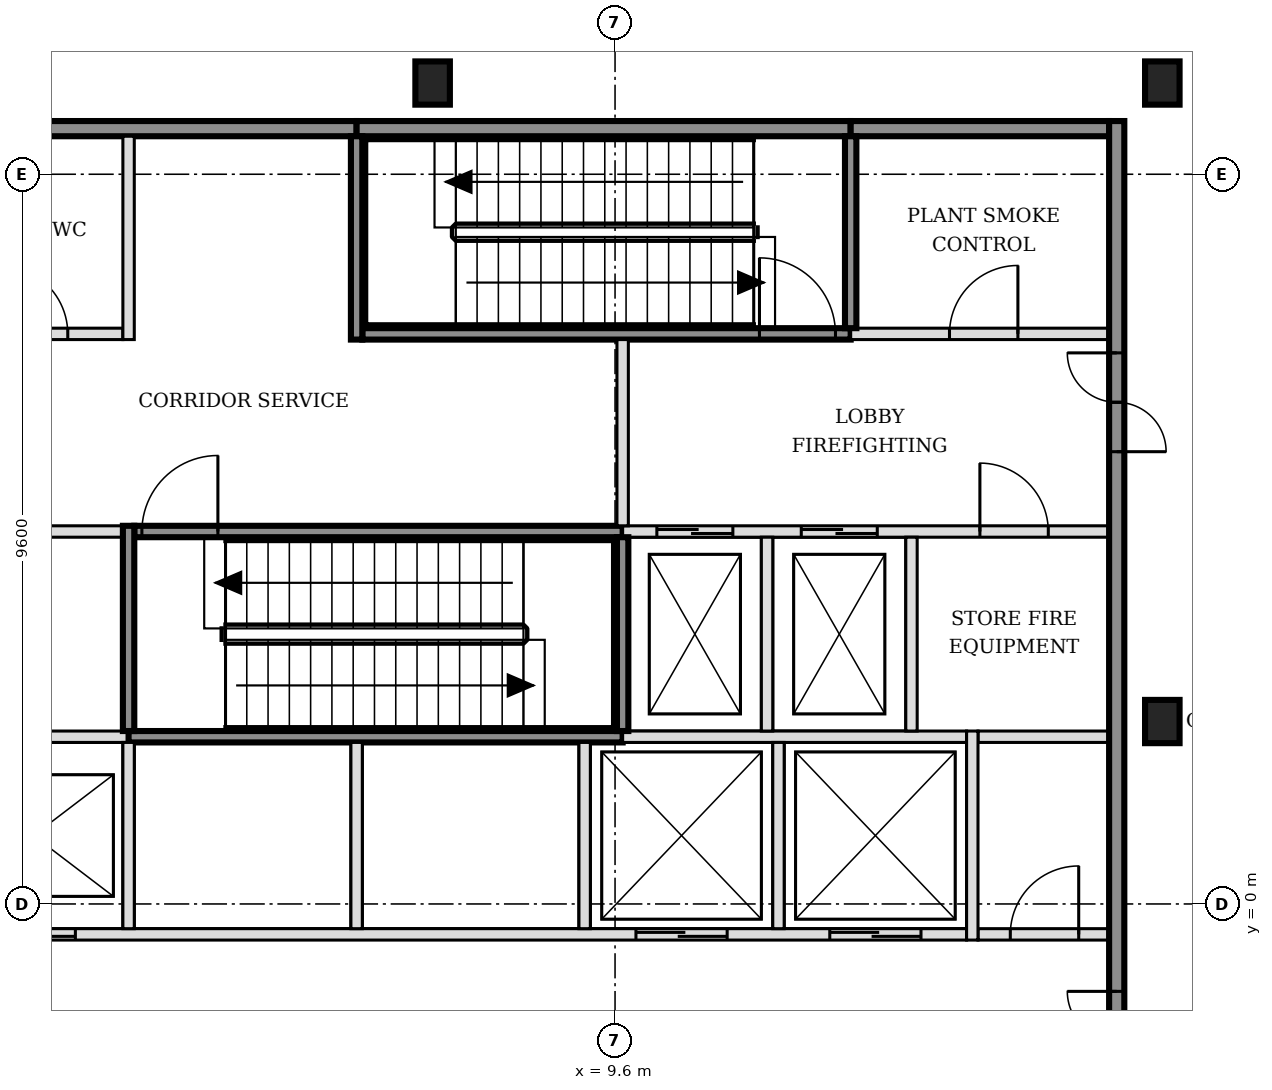
"""IFC4 building model, lengths in metres.
Left out: names, types, materials, properties, quantities, classifications, styles, units other than length and angle.
Written with IfcOpenShell. Run it as: python <this file> out.ifc"""

import sys

from ifc_helpers import new_model, si_unit, direction, frame, frame_2d, origin, origin_2d, place, context, subcontext, project, spatial, rectangle, i_section, extrude, element, fill, save


model = new_model("IFC4")
c1 = context("Model", 3, precision=1e-05, world=origin(), true_north=direction((0.0, 1.0)))
c2 = subcontext(c1, "Body", "Model", "MODEL_VIEW")
j1 = project(units=[si_unit("LENGTHUNIT", "METRE"), si_unit("PLANEANGLEUNIT", "RADIAN")], contexts=[c1])
p1 = place(None, origin())
s1 = spatial("IfcSite", under=j1, at=p1, CompositionType="ELEMENT")
p2 = place(p1, origin())
s2 = spatial("IfcBuilding", under=s1, at=p2, CompositionType="ELEMENT")
p3 = place(p2, frame((0.0, 0.0, 25.8)))
s3 = spatial("IfcBuildingStorey", under=s2, at=p3, CompositionType="ELEMENT", Elevation=25.8)
for number, where, z_axis, x_axis in (
    (1, (16.8, 2.4, -0.2), (0.0, 0.0, 1.0), (1.0, 0.0, 0.0)),
    (2, (7.2, 10.8, -0.2), (0.0, 0.0, 1.0), (1.0, 0.0, 0.0)),
    (3, (16.8, 10.8, -0.2), (0.0, 0.0, 1.0), (1.0, 0.0, 0.0)),
):
    element("IfcColumn", number, at=place(p3, frame(where, z_axis=z_axis, x_axis=x_axis)), inside=s3, PredefinedType="COLUMN", context=c2, shape_type="SweptSolid", body=[
        extrude(i_section(OverallWidth=0.454, OverallDepth=0.569, WebThickness=0.078, FlangeThickness=0.125, FilletRadius=0.015, at=origin_2d()), origin(), (0.0, 0.0, 1.0), 4.8),
    ])
p4 = place(p3, frame((-1.7, -0.4, 0.0), z_axis=(0.0, 0.0, 1.0), x_axis=(1.0, 0.0, 0.0)))
e4 = element("IfcWall", 4, at=p4, inside=s3, PredefinedType="SOLIDWALL", context=c2, shape_type="SweptSolid", body=[
    extrude(rectangle(XDim=15.925, YDim=0.15, at=frame_2d((7.962, 0.0))), origin(), (0.0, 0.0, 1.0), 4.6),
])
p5 = place(p4, frame((0.6, 0.0, 0.0)))
e5 = element("IfcOpeningElement", 5, at=p5, cuts=e4, PredefinedType="OPENING", context=c2, shape_type="SweptSolid", body=[
    extrude(rectangle(XDim=1.1, YDim=2.1, at=frame_2d((0.55, 1.05))), frame((0.0, 0.085, 0.0), z_axis=(0.0, -1.0, 0.0), x_axis=(1.0, 0.0, 0.0)), (0.0, 0.0, 1.0), 0.17),
])
p6 = place(p4, frame((3.1, 0.0, 0.0)))
e6 = element("IfcOpeningElement", 6, at=p6, cuts=e4, PredefinedType="OPENING", context=c2, shape_type="SweptSolid", body=[
    extrude(rectangle(XDim=1.1, YDim=2.1, at=frame_2d((0.55, 1.05))), frame((0.0, 0.085, 0.0), z_axis=(0.0, -1.0, 0.0), x_axis=(1.0, 0.0, 0.0)), (0.0, 0.0, 1.0), 0.17),
])
p7 = place(p4, frame((11.575, 0.0, 0.0)))
e7 = element("IfcOpeningElement", 7, at=p7, cuts=e4, PredefinedType="OPENING", context=c2, shape_type="SweptSolid", body=[
    extrude(rectangle(XDim=1.2, YDim=2.1, at=frame_2d((0.6, 1.05))), frame((0.0, 0.085, 0.0), z_axis=(0.0, -1.0, 0.0), x_axis=(1.0, 0.0, 0.0)), (0.0, 0.0, 1.0), 0.17),
])
p8 = place(p4, frame((14.125, 0.0, 0.0)))
e8 = element("IfcOpeningElement", 8, at=p8, cuts=e4, PredefinedType="OPENING", context=c2, shape_type="SweptSolid", body=[
    extrude(rectangle(XDim=1.2, YDim=2.1, at=frame_2d((0.6, 1.05))), frame((0.0, 0.085, 0.0), z_axis=(0.0, -1.0, 0.0), x_axis=(1.0, 0.0, 0.0)), (0.0, 0.0, 1.0), 0.17),
])
p9 = place(p3, frame((14.375, -0.4, 0.0), z_axis=(0.0, 0.0, 1.0), x_axis=(1.0, 0.0, 0.0)))
e9 = element("IfcWall", 9, at=p9, inside=s3, PredefinedType="PARTITIONING", context=c2, shape_type="SweptSolid", body=[
    extrude(rectangle(XDim=1.725, YDim=0.15, at=frame_2d((0.863, 0.0))), origin(), (0.0, 0.0, 1.0), 4.6),
])
p10 = place(p9, frame((0.425, 0.0, 0.0)))
e10 = element("IfcOpeningElement", 10, at=p10, cuts=e9, PredefinedType="OPENING", context=c2, shape_type="SweptSolid", body=[
    extrude(rectangle(XDim=0.9, YDim=2.1, at=frame_2d((0.45, 1.05))), frame((0.0, 0.085, 0.0), z_axis=(0.0, -1.0, 0.0), x_axis=(1.0, 0.0, 0.0)), (0.0, 0.0, 1.0), 0.17),
])
p11 = place(p3, frame((-1.7, 2.2, 0.0), z_axis=(0.0, 0.0, 1.0), x_axis=(1.0, 0.0, 0.0)))
e11 = element("IfcWall", 11, at=p11, inside=s3, PredefinedType="SOLIDWALL", context=c2, shape_type="SweptSolid", body=[
    extrude(rectangle(XDim=4.9, YDim=0.15, at=frame_2d((2.45, 0.0))), origin(), (0.0, 0.0, 1.0), 4.6),
])
p12 = place(p3, frame((3.2, 2.2, 0.0), z_axis=(0.0, 0.0, 1.0), x_axis=(1.0, 0.0, 0.0)))
e12 = element("IfcWall", 12, at=p12, inside=s3, PredefinedType="SOLIDWALL", context=c2, shape_type="SweptSolid", body=[
    extrude(rectangle(XDim=6.5, YDim=0.15, at=frame_2d((3.25, 0.0))), origin(), (0.0, 0.0, 1.0), 4.6),
])
p13 = place(p3, frame((9.7, 2.2, 0.0), z_axis=(0.0, 0.0, 1.0), x_axis=(1.0, 0.0, 0.0)))
e13 = element("IfcWall", 13, at=p13, inside=s3, PredefinedType="SOLIDWALL", context=c2, shape_type="SweptSolid", body=[
    extrude(rectangle(XDim=4.525, YDim=0.15, at=frame_2d((2.263, 0.0))), origin(), (0.0, 0.0, 1.0), 4.6),
])
p14 = place(p3, frame((14.375, 2.2, 0.0), z_axis=(0.0, 0.0, 1.0), x_axis=(1.0, 0.0, 0.0)))
e14 = element("IfcWall", 14, at=p14, inside=s3, PredefinedType="PARTITIONING", context=c2, shape_type="SweptSolid", body=[
    extrude(rectangle(XDim=1.725, YDim=0.15, at=frame_2d((0.863, 0.0))), origin(), (0.0, 0.0, 1.0), 4.6),
])
p15 = place(p3, frame((-1.7, 4.9, 0.0), z_axis=(0.0, 0.0, 1.0), x_axis=(1.0, 0.0, 0.0)))
e15 = element("IfcWall", 15, at=p15, inside=s3, PredefinedType="PARTITIONING", context=c2, shape_type="SweptSolid", body=[
    extrude(rectangle(XDim=4.825, YDim=0.15, at=frame_2d((2.413, 0.0))), origin(), (0.0, 0.0, 1.0), 4.6),
])
p16 = place(p15, frame((1.95, 0.0, 0.0)))
e16 = element("IfcOpeningElement", 16, at=p16, cuts=e15, PredefinedType="OPENING", context=c2, shape_type="SweptSolid", body=[
    extrude(rectangle(XDim=0.9, YDim=2.1, at=frame_2d((0.45, 1.05))), frame((0.0, 0.085, 0.0), z_axis=(0.0, -1.0, 0.0), x_axis=(1.0, 0.0, 0.0)), (0.0, 0.0, 1.0), 0.17),
])
p17 = place(p3, frame((3.275, 4.9, 0.0), z_axis=(0.0, 0.0, 1.0), x_axis=(1.0, 0.0, 0.0)))
e17 = element("IfcWall", 17, at=p17, inside=s3, PredefinedType="SOLIDWALL", context=c2, shape_type="SweptSolid", body=[
    extrude(rectangle(XDim=6.425, YDim=0.15, at=frame_2d((3.212, 0.0))), origin(), (0.0, 0.0, 1.0), 4.6),
])
p18 = place(p17, frame((0.1, 0.0, 0.0)))
e18 = element("IfcOpeningElement", 18, at=p18, cuts=e17, PredefinedType="OPENING", context=c2, shape_type="SweptSolid", body=[
    extrude(rectangle(XDim=1.0, YDim=2.1, at=frame_2d((0.5, 1.05))), frame((0.0, 0.085, 0.0), z_axis=(0.0, -1.0, 0.0), x_axis=(1.0, 0.0, 0.0)), (0.0, 0.0, 1.0), 0.17),
])
p19 = place(p3, frame((9.7, 4.9, 0.0), z_axis=(0.0, 0.0, 1.0), x_axis=(1.0, 0.0, 0.0)))
e19 = element("IfcWall", 19, at=p19, inside=s3, PredefinedType="SOLIDWALL", context=c2, shape_type="SweptSolid", body=[
    extrude(rectangle(XDim=6.4, YDim=0.15, at=frame_2d((3.2, 0.0))), origin(), (0.0, 0.0, 1.0), 4.6),
])
p20 = place(p19, frame((0.45, 0.0, 0.0)))
e20 = element("IfcOpeningElement", 20, at=p20, cuts=e19, PredefinedType="OPENING", context=c2, shape_type="SweptSolid", body=[
    extrude(rectangle(XDim=1.0, YDim=2.1, at=frame_2d((0.5, 1.05))), frame((0.0, 0.085, 0.0), z_axis=(0.0, -1.0, 0.0), x_axis=(1.0, 0.0, 0.0)), (0.0, 0.0, 1.0), 0.17),
])
p21 = place(p19, frame((2.35, 0.0, 0.0)))
e21 = element("IfcOpeningElement", 21, at=p21, cuts=e19, PredefinedType="OPENING", context=c2, shape_type="SweptSolid", body=[
    extrude(rectangle(XDim=1.0, YDim=2.1, at=frame_2d((0.5, 1.05))), frame((0.0, 0.085, 0.0), z_axis=(0.0, -1.0, 0.0), x_axis=(1.0, 0.0, 0.0)), (0.0, 0.0, 1.0), 0.17),
])
p22 = place(p19, frame((4.7, 0.0, 0.0)))
e22 = element("IfcOpeningElement", 22, at=p22, cuts=e19, PredefinedType="OPENING", context=c2, shape_type="SweptSolid", body=[
    extrude(rectangle(XDim=0.9, YDim=2.1, at=frame_2d((0.45, 1.05))), frame((0.0, 0.085, 0.0), z_axis=(0.0, -1.0, 0.0), x_axis=(1.0, 0.0, 0.0)), (0.0, 0.0, 1.0), 0.17),
])
p23 = place(p3, frame((-1.7, 7.5, 0.0), z_axis=(0.0, 0.0, 1.0), x_axis=(1.0, 0.0, 0.0)))
e23 = element("IfcWall", 23, at=p23, inside=s3, PredefinedType="PARTITIONING", context=c2, shape_type="SweptSolid", body=[
    extrude(rectangle(XDim=4.825, YDim=0.15, at=frame_2d((2.413, 0.0))), origin(), (0.0, 0.0, 1.0), 4.6),
])
p24 = place(p23, frame((0.7, 0.0, 0.0)))
e24 = element("IfcOpeningElement", 24, at=p24, cuts=e23, PredefinedType="OPENING", context=c2, shape_type="SweptSolid", body=[
    extrude(rectangle(XDim=0.9, YDim=2.1, at=frame_2d((0.45, 1.05))), frame((0.0, 0.085, 0.0), z_axis=(0.0, -1.0, 0.0), x_axis=(1.0, 0.0, 0.0)), (0.0, 0.0, 1.0), 0.17),
])
p25 = place(p23, frame((3.2, 0.0, 0.0)))
e25 = element("IfcOpeningElement", 25, at=p25, cuts=e23, PredefinedType="OPENING", context=c2, shape_type="SweptSolid", body=[
    extrude(rectangle(XDim=0.9, YDim=2.1, at=frame_2d((0.45, 1.05))), frame((0.0, 0.085, 0.0), z_axis=(0.0, -1.0, 0.0), x_axis=(1.0, 0.0, 0.0)), (0.0, 0.0, 1.0), 0.17),
])
p26 = place(p3, frame((6.275, 7.5, 0.0), z_axis=(0.0, 0.0, 1.0), x_axis=(1.0, 0.0, 0.0)))
e26 = element("IfcWall", 26, at=p26, inside=s3, PredefinedType="SOLIDWALL", context=c2, shape_type="SweptSolid", body=[
    extrude(rectangle(XDim=6.425, YDim=0.15, at=frame_2d((3.212, 0.0))), origin(), (0.0, 0.0, 1.0), 4.6),
])
p27 = place(p26, frame((5.225, 0.0, 0.0)))
e27 = element("IfcOpeningElement", 27, at=p27, cuts=e26, PredefinedType="OPENING", context=c2, shape_type="SweptSolid", body=[
    extrude(rectangle(XDim=1.0, YDim=2.1, at=frame_2d((0.5, 1.05))), frame((0.0, 0.085, 0.0), z_axis=(0.0, -1.0, 0.0), x_axis=(1.0, 0.0, 0.0)), (0.0, 0.0, 1.0), 0.17),
])
p28 = place(p3, frame((12.7, 7.5, 0.0), z_axis=(0.0, 0.0, 1.0), x_axis=(1.0, 0.0, 0.0)))
e28 = element("IfcWall", 28, at=p28, inside=s3, PredefinedType="SOLIDWALL", context=c2, shape_type="SweptSolid", body=[
    extrude(rectangle(XDim=3.4, YDim=0.15, at=frame_2d((1.7, 0.0))), origin(), (0.0, 0.0, 1.0), 4.6),
])
p29 = place(p28, frame((1.3, 0.0, 0.0)))
e29 = element("IfcOpeningElement", 29, at=p29, cuts=e28, PredefinedType="OPENING", context=c2, shape_type="SweptSolid", body=[
    extrude(rectangle(XDim=0.9, YDim=2.1, at=frame_2d((0.45, 1.05))), frame((0.0, 0.085, 0.0), z_axis=(0.0, -1.0, 0.0), x_axis=(1.0, 0.0, 0.0)), (0.0, 0.0, 1.0), 0.17),
])
p30 = place(p3, frame((-1.7, 10.2, 0.0), z_axis=(0.0, 0.0, 1.0), x_axis=(1.0, 0.0, 0.0)))
e30 = element("IfcWall", 30, at=p30, inside=s3, PredefinedType="SOLIDWALL", context=c2, shape_type="SweptSolid", body=[
    extrude(rectangle(XDim=7.9, YDim=0.2, at=frame_2d((3.95, 0.0))), origin(), (0.0, 0.0, 1.0), 4.6),
])
p31 = place(p3, frame((6.2, 10.2, 0.0), z_axis=(0.0, 0.0, 1.0), x_axis=(1.0, 0.0, 0.0)))
e31 = element("IfcWall", 31, at=p31, inside=s3, PredefinedType="SOLIDWALL", context=c2, shape_type="SweptSolid", body=[
    extrude(rectangle(XDim=6.5, YDim=0.2, at=frame_2d((3.25, 0.0))), origin(), (0.0, 0.0, 1.0), 4.6),
])
p32 = place(p3, frame((12.7, 10.2, 0.0), z_axis=(0.0, 0.0, 1.0), x_axis=(1.0, 0.0, 0.0)))
e32 = element("IfcWall", 32, at=p32, inside=s3, PredefinedType="SOLIDWALL", context=c2, shape_type="SweptSolid", body=[
    extrude(rectangle(XDim=3.4, YDim=0.2, at=frame_2d((1.7, 0.0))), origin(), (0.0, 0.0, 1.0), 4.6),
])
p33 = place(p3, frame((3.2, -0.325, 0.0), z_axis=(0.0, 0.0, 1.0), x_axis=(0.0, 1.0, 0.0)))
e33 = element("IfcWall", 33, at=p33, inside=s3, PredefinedType="SOLIDWALL", context=c2, shape_type="SweptSolid", body=[
    extrude(rectangle(XDim=2.45, YDim=0.15, at=frame_2d((1.225, 0.0))), origin(), (0.0, 0.0, 1.0), 4.6),
])
p34 = place(p3, frame((3.2, 2.275, 0.0), z_axis=(0.0, 0.0, 1.0), x_axis=(0.0, 1.0, 0.0)))
e34 = element("IfcWall", 34, at=p34, inside=s3, PredefinedType="SOLIDWALL", context=c2, shape_type="SweptSolid", body=[
    extrude(rectangle(XDim=2.7, YDim=0.15, at=frame_2d((1.35, 0.0))), origin(), (0.0, 0.0, 1.0), 4.6),
])
p35 = place(p3, frame((3.2, 7.425, 0.0), z_axis=(0.0, 0.0, 1.0), x_axis=(0.0, 1.0, 0.0)))
e35 = element("IfcWall", 35, at=p35, inside=s3, PredefinedType="PARTITIONING", context=c2, shape_type="SweptSolid", body=[
    extrude(rectangle(XDim=2.675, YDim=0.15, at=frame_2d((1.337, 0.0))), origin(), (0.0, 0.0, 1.0), 4.6),
])
p36 = place(p3, frame((6.2, -0.325, 0.0), z_axis=(0.0, 0.0, 1.0), x_axis=(0.0, 1.0, 0.0)))
e36 = element("IfcWall", 36, at=p36, inside=s3, PredefinedType="SOLIDWALL", context=c2, shape_type="SweptSolid", body=[
    extrude(rectangle(XDim=2.45, YDim=0.15, at=frame_2d((1.225, 0.0))), origin(), (0.0, 0.0, 1.0), 4.6),
])
p37 = place(p3, frame((6.2, 7.425, 0.0), z_axis=(0.0, 0.0, 1.0), x_axis=(0.0, 1.0, 0.0)))
e37 = element("IfcWall", 37, at=p37, inside=s3, PredefinedType="SOLIDWALL", context=c2, shape_type="SweptSolid", body=[
    extrude(rectangle(XDim=2.675, YDim=0.15, at=frame_2d((1.337, 0.0))), origin(), (0.0, 0.0, 1.0), 4.6),
])
p38 = place(p3, frame((9.2, -0.325, 0.0), z_axis=(0.0, 0.0, 1.0), x_axis=(0.0, 1.0, 0.0)))
e38 = element("IfcWall", 38, at=p38, inside=s3, PredefinedType="SOLIDWALL", context=c2, shape_type="SweptSolid", body=[
    extrude(rectangle(XDim=2.45, YDim=0.15, at=frame_2d((1.225, 0.0))), origin(), (0.0, 0.0, 1.0), 4.6),
])
p39 = place(p3, frame((9.7, 2.275, 0.0), z_axis=(0.0, 0.0, 1.0), x_axis=(0.0, 1.0, 0.0)))
e39 = element("IfcWall", 39, at=p39, inside=s3, PredefinedType="SOLIDWALL", context=c2, shape_type="SweptSolid", body=[
    extrude(rectangle(XDim=2.55, YDim=0.15, at=frame_2d((1.275, 0.0))), origin(), (0.0, 0.0, 1.0), 4.6),
])
p40 = place(p3, frame((9.7, 4.975, 0.0), z_axis=(0.0, 0.0, 1.0), x_axis=(0.0, 1.0, 0.0)))
e40 = element("IfcWall", 40, at=p40, inside=s3, PredefinedType="SOLIDWALL", context=c2, shape_type="SweptSolid", body=[
    extrude(rectangle(XDim=2.45, YDim=0.15, at=frame_2d((1.225, 0.0))), origin(), (0.0, 0.0, 1.0), 4.6),
])
p41 = place(p3, frame((11.6, 2.275, 0.0), z_axis=(0.0, 0.0, 1.0), x_axis=(0.0, 1.0, 0.0)))
e41 = element("IfcWall", 41, at=p41, inside=s3, PredefinedType="SOLIDWALL", context=c2, shape_type="SweptSolid", body=[
    extrude(rectangle(XDim=2.55, YDim=0.15, at=frame_2d((1.275, 0.0))), origin(), (0.0, 0.0, 1.0), 4.6),
])
p42 = place(p3, frame((11.75, -0.325, 0.0), z_axis=(0.0, 0.0, 1.0), x_axis=(0.0, 1.0, 0.0)))
e42 = element("IfcWall", 42, at=p42, inside=s3, PredefinedType="SOLIDWALL", context=c2, shape_type="SweptSolid", body=[
    extrude(rectangle(XDim=2.45, YDim=0.15, at=frame_2d((1.225, 0.0))), origin(), (0.0, 0.0, 1.0), 4.6),
])
p43 = place(p3, frame((12.7, 7.575, 0.0), z_axis=(0.0, 0.0, 1.0), x_axis=(0.0, 1.0, 0.0)))
e43 = element("IfcWall", 43, at=p43, inside=s3, PredefinedType="SOLIDWALL", context=c2, shape_type="SweptSolid", body=[
    extrude(rectangle(XDim=2.525, YDim=0.15, at=frame_2d((1.263, 0.0))), origin(), (0.0, 0.0, 1.0), 4.6),
])
p44 = place(p3, frame((13.5, 2.275, 0.0), z_axis=(0.0, 0.0, 1.0), x_axis=(0.0, 1.0, 0.0)))
e44 = element("IfcWall", 44, at=p44, inside=s3, PredefinedType="SOLIDWALL", context=c2, shape_type="SweptSolid", body=[
    extrude(rectangle(XDim=2.55, YDim=0.15, at=frame_2d((1.275, 0.0))), origin(), (0.0, 0.0, 1.0), 4.6),
])
p45 = place(p3, frame((14.3, -0.475, 0.0), z_axis=(0.0, 0.0, 1.0), x_axis=(0.0, 1.0, 0.0)))
e45 = element("IfcWall", 45, at=p45, inside=s3, PredefinedType="SOLIDWALL", context=c2, shape_type="SweptSolid", body=[
    extrude(rectangle(XDim=2.75, YDim=0.15, at=frame_2d((1.375, 0.0))), origin(), (0.0, 0.0, 1.0), 4.6),
])
p46 = place(p3, frame((16.2, -5.5, 0.0), z_axis=(0.0, 0.0, 1.0), x_axis=(0.0, 1.0, 0.0)))
e46 = element("IfcWall", 46, at=p46, inside=s3, PredefinedType="SOLIDWALL", context=c2, shape_type="SweptSolid", body=[
    extrude(rectangle(XDim=15.8, YDim=0.2, at=frame_2d((7.9, 0.0))), origin(), (0.0, 0.0, 1.0), 4.6),
])
p47 = place(p46, frame((3.05, 0.0, 0.0)))
e47 = element("IfcOpeningElement", 47, at=p47, cuts=e46, PredefinedType="OPENING", context=c2, shape_type="SweptSolid", body=[
    extrude(rectangle(XDim=1.3, YDim=2.1, at=frame_2d((0.65, 1.05))), frame((0.0, 0.11, 0.0), z_axis=(0.0, -1.0, 0.0), x_axis=(1.0, 0.0, 0.0)), (0.0, 0.0, 1.0), 0.22),
])
p48 = place(p46, frame((11.45, 0.0, 0.0)))
e48 = element("IfcOpeningElement", 48, at=p48, cuts=e46, PredefinedType="OPENING", context=c2, shape_type="SweptSolid", body=[
    extrude(rectangle(XDim=1.3, YDim=2.1, at=frame_2d((0.65, 1.05))), frame((0.0, 0.11, 0.0), z_axis=(0.0, -1.0, 0.0), x_axis=(1.0, 0.0, 0.0)), (0.0, 0.0, 1.0), 0.22),
])
p49 = place(p6, origin())
e49 = element("IfcDoor", 49, at=p49, inside=s3, OperationType="DOUBLE_DOOR_SLIDING", PredefinedType="DOOR", context=c2, shape_type="SweptSolid", body=[
    extrude(rectangle(XDim=1.1, YDim=2.1, at=frame_2d((0.55, 1.05))), frame((0.0, 0.025, 0.0), z_axis=(0.0, -1.0, 0.0), x_axis=(1.0, 0.0, 0.0)), (0.0, 0.0, 1.0), 0.05),
])
fill(e6, e49)
p50 = place(p7, origin())
e50 = element("IfcDoor", 50, at=p50, inside=s3, OperationType="DOUBLE_DOOR_SLIDING", PredefinedType="DOOR", context=c2, shape_type="SweptSolid", body=[
    extrude(rectangle(XDim=1.2, YDim=2.1, at=frame_2d((0.6, 1.05))), frame((0.0, 0.025, 0.0), z_axis=(0.0, -1.0, 0.0), x_axis=(1.0, 0.0, 0.0)), (0.0, 0.0, 1.0), 0.05),
])
fill(e7, e50)
p51 = place(p8, origin())
e51 = element("IfcDoor", 51, at=p51, inside=s3, OperationType="DOUBLE_DOOR_SLIDING", PredefinedType="DOOR", context=c2, shape_type="SweptSolid", body=[
    extrude(rectangle(XDim=1.2, YDim=2.1, at=frame_2d((0.6, 1.05))), frame((0.0, 0.025, 0.0), z_axis=(0.0, -1.0, 0.0), x_axis=(1.0, 0.0, 0.0)), (0.0, 0.0, 1.0), 0.05),
])
fill(e8, e51)
p52 = place(p20, origin())
e52 = element("IfcDoor", 52, at=p52, inside=s3, OperationType="DOUBLE_DOOR_SLIDING", PredefinedType="DOOR", context=c2, shape_type="SweptSolid", body=[
    extrude(rectangle(XDim=1.0, YDim=2.1, at=frame_2d((0.5, 1.05))), frame((0.0, 0.025, 0.0), z_axis=(0.0, -1.0, 0.0), x_axis=(1.0, 0.0, 0.0)), (0.0, 0.0, 1.0), 0.05),
])
fill(e20, e52)
p53 = place(p21, origin())
e53 = element("IfcDoor", 53, at=p53, inside=s3, OperationType="DOUBLE_DOOR_SLIDING", PredefinedType="DOOR", context=c2, shape_type="SweptSolid", body=[
    extrude(rectangle(XDim=1.0, YDim=2.1, at=frame_2d((0.5, 1.05))), frame((0.0, 0.025, 0.0), z_axis=(0.0, -1.0, 0.0), x_axis=(1.0, 0.0, 0.0)), (0.0, 0.0, 1.0), 0.05),
])
fill(e21, e53)
p54 = place(p18, origin())
e54 = element("IfcDoor", 54, at=p54, inside=s3, OperationType="SINGLE_SWING_RIGHT", PredefinedType="DOOR", context=c2, shape_type="SweptSolid", body=[
    extrude(rectangle(XDim=1.0, YDim=2.1, at=frame_2d((0.5, 1.05))), frame((0.0, 0.025, 0.0), z_axis=(0.0, -1.0, 0.0), x_axis=(1.0, 0.0, 0.0)), (0.0, 0.0, 1.0), 0.05),
])
fill(e18, e54)
p55 = place(p27, origin())
e55 = element("IfcDoor", 55, at=p55, inside=s3, OperationType="SINGLE_SWING_LEFT", PredefinedType="DOOR", context=c2, shape_type="SweptSolid", body=[
    extrude(rectangle(XDim=1.0, YDim=2.1, at=frame_2d((0.5, 1.05))), frame((0.0, 0.025, 0.0), z_axis=(0.0, -1.0, 0.0), x_axis=(1.0, 0.0, 0.0)), (0.0, 0.0, 1.0), 0.05),
])
fill(e27, e55)
p56 = place(p47, origin())
e56 = element("IfcDoor", 56, at=p56, inside=s3, OperationType="DOUBLE_DOOR_SINGLE_SWING", PredefinedType="DOOR", context=c2, shape_type="SweptSolid", body=[
    extrude(rectangle(XDim=1.3, YDim=2.1, at=frame_2d((0.65, 1.05))), frame((0.0, 0.025, 0.0), z_axis=(0.0, -1.0, 0.0), x_axis=(1.0, 0.0, 0.0)), (0.0, 0.0, 1.0), 0.05),
])
fill(e47, e56)
p57 = place(p48, origin())
e57 = element("IfcDoor", 57, at=p57, inside=s3, OperationType="DOUBLE_DOOR_SINGLE_SWING", PredefinedType="DOOR", context=c2, shape_type="SweptSolid", body=[
    extrude(rectangle(XDim=1.3, YDim=2.1, at=frame_2d((0.65, 1.05))), frame((0.0, 0.025, 0.0), z_axis=(0.0, -1.0, 0.0), x_axis=(1.0, 0.0, 0.0)), (0.0, 0.0, 1.0), 0.05),
])
fill(e48, e57)
p58 = place(p10, origin())
e58 = element("IfcDoor", 58, at=p58, inside=s3, OperationType="SINGLE_SWING_RIGHT", PredefinedType="DOOR", context=c2, shape_type="SweptSolid", body=[
    extrude(rectangle(XDim=0.9, YDim=2.1, at=frame_2d((0.45, 1.05))), frame((0.0, 0.025, 0.0), z_axis=(0.0, -1.0, 0.0), x_axis=(1.0, 0.0, 0.0)), (0.0, 0.0, 1.0), 0.05),
])
fill(e10, e58)
p59 = place(p22, origin())
e59 = element("IfcDoor", 59, at=p59, inside=s3, OperationType="SINGLE_SWING_LEFT", PredefinedType="DOOR", context=c2, shape_type="SweptSolid", body=[
    extrude(rectangle(XDim=0.9, YDim=2.1, at=frame_2d((0.45, 1.05))), frame((0.0, 0.025, 0.0), z_axis=(0.0, -1.0, 0.0), x_axis=(1.0, 0.0, 0.0)), (0.0, 0.0, 1.0), 0.05),
])
fill(e22, e59)
p60 = place(p29, origin())
e60 = element("IfcDoor", 60, at=p60, inside=s3, OperationType="SINGLE_SWING_RIGHT", PredefinedType="DOOR", context=c2, shape_type="SweptSolid", body=[
    extrude(rectangle(XDim=0.9, YDim=2.1, at=frame_2d((0.45, 1.05))), frame((0.0, 0.025, 0.0), z_axis=(0.0, -1.0, 0.0), x_axis=(1.0, 0.0, 0.0)), (0.0, 0.0, 1.0), 0.05),
])
fill(e29, e60)
p61 = place(p25, origin())
e61 = element("IfcDoor", 61, at=p61, inside=s3, OperationType="SINGLE_SWING_LEFT", PredefinedType="DOOR", context=c2, shape_type="SweptSolid", body=[
    extrude(rectangle(XDim=0.9, YDim=2.1, at=frame_2d((0.45, 1.05))), frame((0.0, 0.025, 0.0), z_axis=(0.0, -1.0, 0.0), x_axis=(1.0, 0.0, 0.0)), (0.0, 0.0, 1.0), 0.05),
])
fill(e25, e61)
save(model, sys.argv[1])
